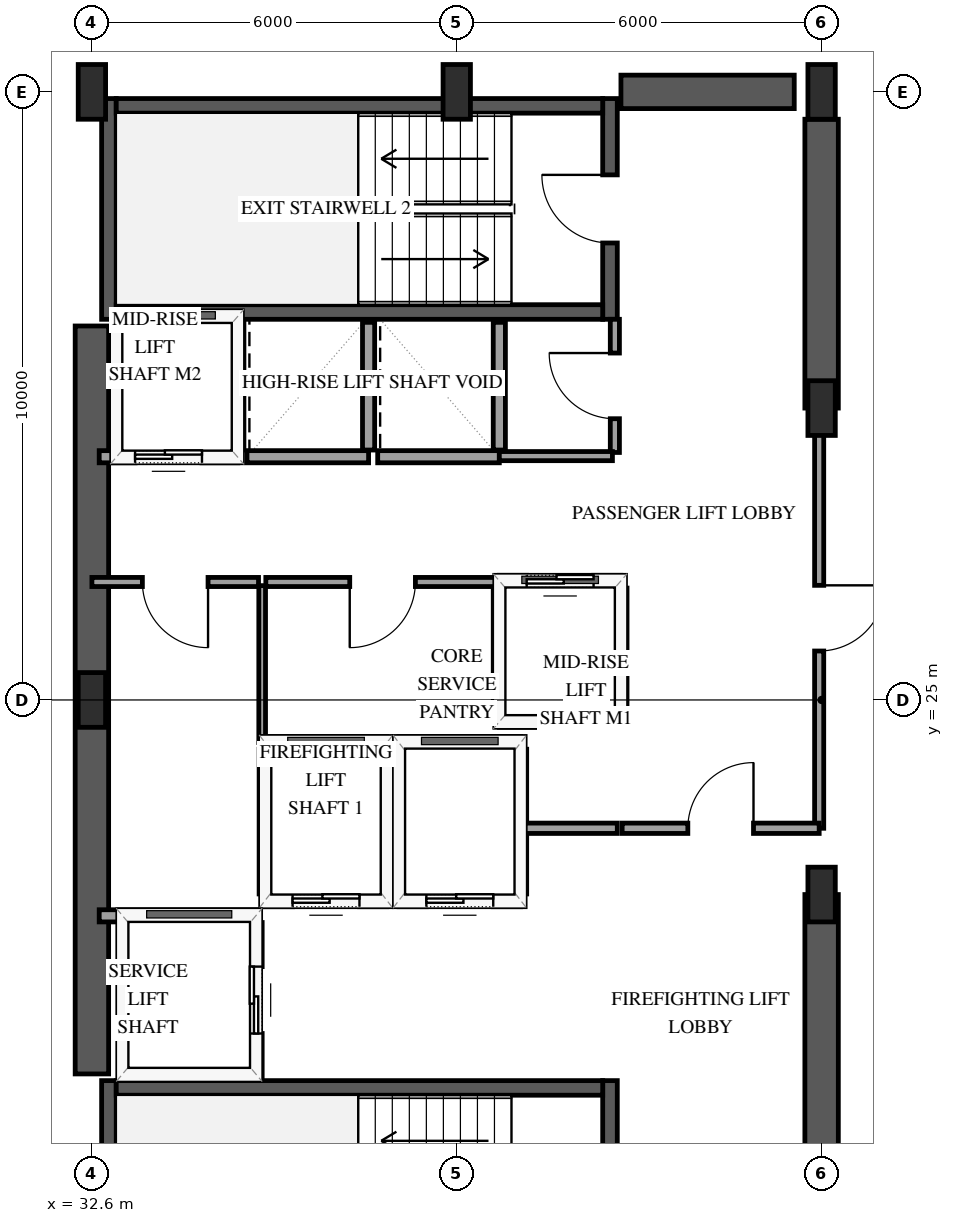
"""IFC4 building model, lengths in metres.
Left out: names, types, materials, properties, quantities, classifications, styles, units other than length and angle.
Written with IfcOpenShell. Run it as: python <this file> out.ifc"""

import sys

from ifc_helpers import new_model, si_unit, direction, frame, frame_2d, origin, origin_2d, place, context, subcontext, project, spatial, rectangle, extrude, element, fill, save


model = new_model("IFC4")
c1 = context("Model", 3, precision=1e-05, world=origin(), true_north=direction((0.0, 1.0)))
c2 = subcontext(c1, "Body", "Model", "MODEL_VIEW")
j1 = project(units=[si_unit("LENGTHUNIT", "METRE"), si_unit("PLANEANGLEUNIT", "RADIAN")], contexts=[c1])
p1 = place(None, origin())
s1 = spatial("IfcSite", under=j1, at=p1, CompositionType="ELEMENT")
p2 = place(p1, origin())
s2 = spatial("IfcBuilding", under=s1, at=p2, CompositionType="ELEMENT")
p3 = place(p2, frame((0.0, 0.0, 182.2)))
s3 = spatial("IfcBuildingStorey", under=s2, at=p3, CompositionType="ELEMENT", Elevation=182.2)
p4 = place(p3, frame((32.88, 15.11, 0.0), z_axis=(0.0, 0.0, 1.0), x_axis=(0.0, 1.0, 0.0)))
e1 = element("IfcWall", 1, at=p4, inside=s3, PredefinedType="SHEAR", context=c2, shape_type="SweptSolid", body=[
    extrude(rectangle(XDim=3.63, YDim=0.24, at=frame_2d((1.815, 0.0))), origin(), (0.0, 0.0, 1.0), 3.6),
])
p5 = place(p3, frame((41.12, 15.11, 0.0), z_axis=(0.0, 0.0, 1.0), x_axis=(0.0, 1.0, 0.0)))
e2 = element("IfcWall", 2, at=p5, inside=s3, PredefinedType="SHEAR", context=c2, shape_type="SweptSolid", body=[
    extrude(rectangle(XDim=3.63, YDim=0.24, at=frame_2d((1.815, 0.0))), origin(), (0.0, 0.0, 1.0), 3.6),
])
p6 = place(p5, frame((1.255, 0.0, 0.0)))
e3 = element("IfcOpeningElement", 3, at=p6, cuts=e2, PredefinedType="OPENING", context=c2, shape_type="SweptSolid", body=[
    extrude(rectangle(XDim=1.12, YDim=2.15, at=frame_2d((0.56, 1.075))), frame((0.0, 0.13, 0.0), z_axis=(0.0, -1.0, 0.0), x_axis=(1.0, 0.0, 0.0)), (0.0, 0.0, 1.0), 0.26),
])
p7 = place(p3, frame((33.0, 18.62, 0.0), z_axis=(0.0, 0.0, 1.0), x_axis=(1.0, 0.0, 0.0)))
e4 = element("IfcWall", 4, at=p7, inside=s3, PredefinedType="SHEAR", context=c2, shape_type="SweptSolid", body=[
    extrude(rectangle(XDim=8.0, YDim=0.24, at=frame_2d((4.0, 0.0))), origin(), (0.0, 0.0, 1.0), 3.6),
])
p8 = place(p3, frame((32.88, 31.26, 0.0), z_axis=(0.0, 0.0, 1.0), x_axis=(0.0, 1.0, 0.0)))
e5 = element("IfcWall", 5, at=p8, inside=s3, PredefinedType="SHEAR", context=c2, shape_type="SweptSolid", body=[
    extrude(rectangle(XDim=3.63, YDim=0.24, at=frame_2d((1.815, 0.0))), origin(), (0.0, 0.0, 1.0), 3.6),
])
p9 = place(p3, frame((41.12, 31.26, 0.0), z_axis=(0.0, 0.0, 1.0), x_axis=(0.0, 1.0, 0.0)))
e6 = element("IfcWall", 6, at=p9, inside=s3, PredefinedType="SHEAR", context=c2, shape_type="SweptSolid", body=[
    extrude(rectangle(XDim=3.63, YDim=0.24, at=frame_2d((1.815, 0.0))), origin(), (0.0, 0.0, 1.0), 3.6),
])
p10 = place(p9, frame((1.255, 0.0, 0.0)))
e7 = element("IfcOpeningElement", 7, at=p10, cuts=e6, PredefinedType="OPENING", context=c2, shape_type="SweptSolid", body=[
    extrude(rectangle(XDim=1.12, YDim=2.15, at=frame_2d((0.56, 1.075))), frame((0.0, 0.13, 0.0), z_axis=(0.0, -1.0, 0.0), x_axis=(1.0, 0.0, 0.0)), (0.0, 0.0, 1.0), 0.26),
])
for number, where, z_axis, x_axis in (
    (8, (33.0, 31.38, 0.0), (0.0, 0.0, 1.0), (1.0, 0.0, 0.0)),
    (9, (33.0, 34.77, 0.0), (0.0, 0.0, 1.0), (1.0, 0.0, 0.0)),
):
    element("IfcWall", number, at=place(p3, frame(where, z_axis=z_axis, x_axis=x_axis)), inside=s3, PredefinedType="SHEAR", context=c2, shape_type="SweptSolid", body=[
        extrude(rectangle(XDim=8.0, YDim=0.24, at=frame_2d((4.0, 0.0))), origin(), (0.0, 0.0, 1.0), 3.6),
    ])
p11 = place(p3, frame((32.6, 18.85, 0.0), z_axis=(0.0, 0.0, 1.0), x_axis=(0.0, 1.0, 0.0)))
e10 = element("IfcWall", 10, at=p11, inside=s3, PredefinedType="SHEAR", context=c2, shape_type="SweptSolid", body=[
    extrude(rectangle(XDim=12.3, YDim=0.55, at=frame_2d((6.15, 0.0))), origin(), (0.0, 0.0, 1.0), 3.6),
])
p12 = place(p3, frame((41.3, 35.0, 0.0), z_axis=(0.0, 0.0, 1.0), x_axis=(1.0, 0.0, 0.0)))
e11 = element("IfcWall", 11, at=p12, inside=s3, PredefinedType="SHEAR", context=c2, shape_type="SweptSolid", body=[
    extrude(rectangle(XDim=2.85, YDim=0.55, at=frame_2d((1.425, 0.0))), origin(), (0.0, 0.0, 1.0), 3.6),
])
p13 = place(p3, frame((44.6, 15.45, 0.0), z_axis=(0.0, 0.0, 1.0), x_axis=(0.0, 1.0, 0.0)))
e12 = element("IfcWall", 12, at=p13, inside=s3, PredefinedType="SHEAR", context=c2, shape_type="SweptSolid", body=[
    extrude(rectangle(XDim=6.35, YDim=0.55, at=frame_2d((3.175, 0.0))), origin(), (0.0, 0.0, 1.0), 3.6),
])
p14 = place(p3, frame((44.6, 29.8, 0.0), z_axis=(0.0, 0.0, 1.0), x_axis=(0.0, 1.0, 0.0)))
e13 = element("IfcWall", 13, at=p14, inside=s3, PredefinedType="SHEAR", context=c2, shape_type="SweptSolid", body=[
    extrude(rectangle(XDim=4.75, YDim=0.55, at=frame_2d((2.375, 0.0))), origin(), (0.0, 0.0, 1.0), 3.6),
])
for number, where, z_axis, x_axis in (
    (14, (32.6, 25.0, 0.0), (0.0, 0.0, 1.0), (1.0, 0.0, 0.0)),
    (15, (32.6, 35.0, 0.0), (0.0, 0.0, 1.0), (1.0, 0.0, 0.0)),
    (16, (38.6, 35.0, 0.0), (0.0, 0.0, 1.0), (1.0, 0.0, 0.0)),
    (17, (44.6, 21.8, 0.0), (0.0, 0.0, 1.0), (1.0, 0.0, 0.0)),
    (18, (44.6, 29.8, 0.0), (0.0, 0.0, 1.0), (1.0, 0.0, 0.0)),
    (19, (44.6, 35.0, 0.0), (0.0, 0.0, 1.0), (1.0, 0.0, 0.0)),
):
    element("IfcColumn", number, at=place(p3, frame(where, z_axis=z_axis, x_axis=x_axis)), inside=s3, PredefinedType="PILASTER", context=c2, shape_type="SweptSolid", body=[
        extrude(rectangle(XDim=0.45, YDim=0.9, at=origin_2d()), origin(), (0.0, 0.0, 1.0), 3.6),
    ])
p15 = place(p3, frame((35.45, 21.7, 0.0), z_axis=(0.0, 0.0, 1.0), x_axis=(1.0, 0.0, 0.0)))
e20 = element("IfcWall", 20, at=p15, inside=s3, PredefinedType="SOLIDWALL", context=c2, shape_type="SweptSolid", body=[
    extrude(rectangle(XDim=2.0, YDim=0.2, at=frame_2d((1.0, 0.0))), origin(), (0.0, 0.0, 1.0), 3.26),
])
p16 = place(p15, frame((0.45, 0.0, 0.0)))
e21 = element("IfcOpeningElement", 21, at=p16, cuts=e20, PredefinedType="OPENING", context=c2, shape_type="SweptSolid", body=[
    extrude(rectangle(XDim=1.1, YDim=2.15, at=frame_2d((0.55, 1.075))), frame((0.0, 0.11, 0.0), z_axis=(0.0, -1.0, 0.0), x_axis=(1.0, 0.0, 0.0)), (0.0, 0.0, 1.0), 0.22),
])
p17 = place(p3, frame((35.45, 24.3, 0.0), z_axis=(0.0, 0.0, 1.0), x_axis=(1.0, 0.0, 0.0)))
e22 = element("IfcWall", 22, at=p17, inside=s3, PredefinedType="SOLIDWALL", context=c2, shape_type="SweptSolid", body=[
    extrude(rectangle(XDim=2.0, YDim=0.2, at=frame_2d((1.0, 0.0))), origin(), (0.0, 0.0, 1.0), 3.26),
])
for number, where, z_axis, x_axis in (
    (23, (35.45, 21.81, 0.0), (0.0, 0.0, 1.0), (0.0, 1.0, 0.0)),
    (24, (37.45, 21.81, 0.0), (0.0, 0.0, 1.0), (0.0, 1.0, 0.0)),
):
    element("IfcWall", number, at=place(p3, frame(where, z_axis=z_axis, x_axis=x_axis)), inside=s3, PredefinedType="SOLIDWALL", context=c2, shape_type="SweptSolid", body=[
        extrude(rectangle(XDim=2.38, YDim=0.2, at=frame_2d((1.19, 0.0))), origin(), (0.0, 0.0, 1.0), 3.26),
    ])
p18 = place(p3, frame((37.65, 21.7, 0.0), z_axis=(0.0, 0.0, 1.0), x_axis=(1.0, 0.0, 0.0)))
e25 = element("IfcWall", 25, at=p18, inside=s3, PredefinedType="SOLIDWALL", context=c2, shape_type="SweptSolid", body=[
    extrude(rectangle(XDim=2.0, YDim=0.2, at=frame_2d((1.0, 0.0))), origin(), (0.0, 0.0, 1.0), 3.26),
])
p19 = place(p18, frame((0.45, 0.0, 0.0)))
e26 = element("IfcOpeningElement", 26, at=p19, cuts=e25, PredefinedType="OPENING", context=c2, shape_type="SweptSolid", body=[
    extrude(rectangle(XDim=1.1, YDim=2.15, at=frame_2d((0.55, 1.075))), frame((0.0, 0.11, 0.0), z_axis=(0.0, -1.0, 0.0), x_axis=(1.0, 0.0, 0.0)), (0.0, 0.0, 1.0), 0.22),
])
p20 = place(p3, frame((37.65, 24.3, 0.0), z_axis=(0.0, 0.0, 1.0), x_axis=(1.0, 0.0, 0.0)))
e27 = element("IfcWall", 27, at=p20, inside=s3, PredefinedType="SOLIDWALL", context=c2, shape_type="SweptSolid", body=[
    extrude(rectangle(XDim=2.0, YDim=0.2, at=frame_2d((1.0, 0.0))), origin(), (0.0, 0.0, 1.0), 3.26),
])
p21 = place(p3, frame((39.65, 21.81, 0.0), z_axis=(0.0, 0.0, 1.0), x_axis=(0.0, 1.0, 0.0)))
e28 = element("IfcWall", 28, at=p21, inside=s3, PredefinedType="SOLIDWALL", context=c2, shape_type="SweptSolid", body=[
    extrude(rectangle(XDim=2.38, YDim=0.2, at=frame_2d((1.19, 0.0))), origin(), (0.0, 0.0, 1.0), 3.26),
])
p22 = place(p3, frame((32.72, 21.45, 0.0), z_axis=(0.0, 0.0, 1.0), x_axis=(1.0, 0.0, 0.0)))
e29 = element("IfcWall", 29, at=p22, inside=s3, PredefinedType="SOLIDWALL", context=c2, shape_type="SweptSolid", body=[
    extrude(rectangle(XDim=2.58, YDim=0.2, at=frame_2d((1.29, 0.0))), origin(), (0.0, 0.0, 1.0), 3.26),
])
p23 = place(p3, frame((35.3, 18.79, 0.0), z_axis=(0.0, 0.0, 1.0), x_axis=(0.0, 1.0, 0.0)))
e30 = element("IfcWall", 30, at=p23, inside=s3, PredefinedType="SOLIDWALL", context=c2, shape_type="SweptSolid", body=[
    extrude(rectangle(XDim=2.55, YDim=0.2, at=frame_2d((1.275, 0.0))), origin(), (0.0, 0.0, 1.0), 3.26),
])
p24 = place(p23, frame((0.725, 0.0, 0.0)))
e31 = element("IfcOpeningElement", 31, at=p24, cuts=e30, PredefinedType="OPENING", context=c2, shape_type="SweptSolid", body=[
    extrude(rectangle(XDim=1.1, YDim=2.15, at=frame_2d((0.55, 1.075))), frame((0.0, 0.11, 0.0), z_axis=(0.0, -1.0, 0.0), x_axis=(1.0, 0.0, 0.0)), (0.0, 0.0, 1.0), 0.22),
])
p25 = place(p3, frame((39.3, 24.65, 0.0), z_axis=(0.0, 0.0, 1.0), x_axis=(1.0, 0.0, 0.0)))
e32 = element("IfcWall", 32, at=p25, inside=s3, PredefinedType="SOLIDWALL", context=c2, shape_type="SweptSolid", body=[
    extrude(rectangle(XDim=2.0, YDim=0.2, at=frame_2d((1.0, 0.0))), origin(), (0.0, 0.0, 1.0), 3.26),
])
p26 = place(p3, frame((39.3, 26.95, 0.0), z_axis=(0.0, 0.0, 1.0), x_axis=(1.0, 0.0, 0.0)))
e33 = element("IfcWall", 33, at=p26, inside=s3, PredefinedType="SOLIDWALL", context=c2, shape_type="SweptSolid", body=[
    extrude(rectangle(XDim=2.0, YDim=0.2, at=frame_2d((1.0, 0.0))), origin(), (0.0, 0.0, 1.0), 3.26),
])
p27 = place(p26, frame((0.45, 0.0, 0.0)))
e34 = element("IfcOpeningElement", 34, at=p27, cuts=e33, PredefinedType="OPENING", context=c2, shape_type="SweptSolid", body=[
    extrude(rectangle(XDim=1.1, YDim=2.15, at=frame_2d((0.55, 1.075))), frame((0.0, 0.11, 0.0), z_axis=(0.0, -1.0, 0.0), x_axis=(1.0, 0.0, 0.0)), (0.0, 0.0, 1.0), 0.22),
])
for number, where, z_axis, x_axis in (
    (35, (39.3, 24.76, 0.0), (0.0, 0.0, 1.0), (0.0, 1.0, 0.0)),
    (36, (41.3, 24.76, 0.0), (0.0, 0.0, 1.0), (0.0, 1.0, 0.0)),
):
    element("IfcWall", number, at=place(p3, frame(where, z_axis=z_axis, x_axis=x_axis)), inside=s3, PredefinedType="SOLIDWALL", context=c2, shape_type="SweptSolid", body=[
        extrude(rectangle(XDim=2.08, YDim=0.2, at=frame_2d((1.04, 0.0))), origin(), (0.0, 0.0, 1.0), 3.26),
    ])
p28 = place(p3, frame((32.72, 29.0, 0.0), z_axis=(0.0, 0.0, 1.0), x_axis=(1.0, 0.0, 0.0)))
e37 = element("IfcWall", 37, at=p28, inside=s3, PredefinedType="SOLIDWALL", context=c2, shape_type="SweptSolid", body=[
    extrude(rectangle(XDim=2.28, YDim=0.2, at=frame_2d((1.14, 0.0))), origin(), (0.0, 0.0, 1.0), 3.26),
])
p29 = place(p28, frame((0.59, 0.0, 0.0)))
e38 = element("IfcOpeningElement", 38, at=p29, cuts=e37, PredefinedType="OPENING", context=c2, shape_type="SweptSolid", body=[
    extrude(rectangle(XDim=1.1, YDim=2.15, at=frame_2d((0.55, 1.075))), frame((0.0, 0.11, 0.0), z_axis=(0.0, -1.0, 0.0), x_axis=(1.0, 0.0, 0.0)), (0.0, 0.0, 1.0), 0.22),
])
p30 = place(p3, frame((35.0, 29.11, 0.0), z_axis=(0.0, 0.0, 1.0), x_axis=(0.0, 1.0, 0.0)))
e39 = element("IfcWall", 39, at=p30, inside=s3, PredefinedType="SOLIDWALL", context=c2, shape_type="SweptSolid", body=[
    extrude(rectangle(XDim=2.1, YDim=0.2, at=frame_2d((1.05, 0.0))), origin(), (0.0, 0.0, 1.0), 3.26),
])
p31 = place(p3, frame((35.15, 29.0, 0.0), z_axis=(0.0, 0.0, 1.0), x_axis=(1.0, 0.0, 0.0)))
e40 = element("IfcWall", 40, at=p31, inside=s3, PredefinedType="SOLIDWALL", context=c2, shape_type="SweptSolid", body=[
    extrude(rectangle(XDim=2.0, YDim=0.2, at=frame_2d((1.0, 0.0))), origin(), (0.0, 0.0, 1.0), 3.26),
])
p32 = place(p3, frame((37.15, 29.11, 0.0), z_axis=(0.0, 0.0, 1.0), x_axis=(0.0, 1.0, 0.0)))
e41 = element("IfcWall", 41, at=p32, inside=s3, PredefinedType="SOLIDWALL", context=c2, shape_type="SweptSolid", body=[
    extrude(rectangle(XDim=2.1, YDim=0.2, at=frame_2d((1.05, 0.0))), origin(), (0.0, 0.0, 1.0), 3.26),
])
p33 = place(p3, frame((37.3, 29.0, 0.0), z_axis=(0.0, 0.0, 1.0), x_axis=(1.0, 0.0, 0.0)))
e42 = element("IfcWall", 42, at=p33, inside=s3, PredefinedType="SOLIDWALL", context=c2, shape_type="SweptSolid", body=[
    extrude(rectangle(XDim=2.0, YDim=0.2, at=frame_2d((1.0, 0.0))), origin(), (0.0, 0.0, 1.0), 3.26),
])
p34 = place(p3, frame((39.3, 29.11, 0.0), z_axis=(0.0, 0.0, 1.0), x_axis=(0.0, 1.0, 0.0)))
e43 = element("IfcWall", 43, at=p34, inside=s3, PredefinedType="SOLIDWALL", context=c2, shape_type="SweptSolid", body=[
    extrude(rectangle(XDim=2.1, YDim=0.2, at=frame_2d((1.05, 0.0))), origin(), (0.0, 0.0, 1.0), 3.26),
])
p35 = place(p3, frame((44.56, 29.8, 0.0), z_axis=(0.0, 0.0, 1.0), x_axis=(0.0, -1.0, 0.0)))
e44 = element("IfcWall", 44, at=p35, inside=s3, PredefinedType="PARTITIONING", context=c2, shape_type="SweptSolid", body=[
    extrude(rectangle(XDim=6.91, YDim=0.15, at=frame_2d((3.455, 0.0))), origin(), (0.0, 0.0, 1.0), 2.3),
])
p36 = place(p35, frame((2.915, 0.0, 0.0)))
e45 = element("IfcOpeningElement", 45, at=p36, cuts=e44, PredefinedType="OPENING", context=c2, shape_type="SweptSolid", body=[
    extrude(rectangle(XDim=1.08, YDim=2.15, at=frame_2d((0.54, 1.075))), frame((0.0, 0.085, 0.0), z_axis=(0.0, -1.0, 0.0), x_axis=(1.0, 0.0, 0.0)), (0.0, 0.0, 1.0), 0.17),
])
p37 = place(p3, frame((39.3, 26.94, 0.0), z_axis=(0.0, 0.0, 1.0), x_axis=(-1.0, 0.0, 0.0)))
e46 = element("IfcWall", 46, at=p37, inside=s3, PredefinedType="PARTITIONING", context=c2, shape_type="SweptSolid", body=[
    extrude(rectangle(XDim=3.84, YDim=0.15, at=frame_2d((1.92, 0.0))), origin(), (0.0, 0.0, 1.0), 3.26),
])
p38 = place(p37, frame((1.38, 0.0, 0.0)))
e47 = element("IfcOpeningElement", 47, at=p38, cuts=e46, PredefinedType="OPENING", context=c2, shape_type="SweptSolid", body=[
    extrude(rectangle(XDim=1.08, YDim=2.15, at=frame_2d((0.54, 1.075))), frame((0.0, 0.085, 0.0), z_axis=(0.0, -1.0, 0.0), x_axis=(1.0, 0.0, 0.0)), (0.0, 0.0, 1.0), 0.17),
])
p39 = place(p3, frame((41.32, 22.89, 0.0), z_axis=(0.0, 0.0, 1.0), x_axis=(1.0, 0.0, 0.0)))
e48 = element("IfcWall", 48, at=p39, inside=s3, PredefinedType="PARTITIONING", context=c2, shape_type="SweptSolid", body=[
    extrude(rectangle(XDim=3.24, YDim=0.17, at=frame_2d((1.62, 0.0))), origin(), (0.0, 0.0, 1.0), 3.26),
])
p40 = place(p39, frame((1.08, 0.0, 0.0)))
e49 = element("IfcOpeningElement", 49, at=p40, cuts=e48, PredefinedType="OPENING", context=c2, shape_type="SweptSolid", body=[
    extrude(rectangle(XDim=1.08, YDim=2.15, at=frame_2d((0.54, 1.075))), frame((0.0, 0.095, 0.0), z_axis=(0.0, -1.0, 0.0), x_axis=(1.0, 0.0, 0.0)), (0.0, 0.0, 1.0), 0.19),
])
p41 = place(p3, frame((35.34, 26.94, 0.0), z_axis=(0.0, 0.0, 1.0), x_axis=(-1.0, 0.0, 0.0)))
e50 = element("IfcWall", 50, at=p41, inside=s3, PredefinedType="PARTITIONING", context=c2, shape_type="SweptSolid", body=[
    extrude(rectangle(XDim=2.74, YDim=0.15, at=frame_2d((1.37, 0.0))), origin(), (0.0, 0.0, 1.0), 3.26),
])
p42 = place(p41, frame((0.83, 0.0, 0.0)))
e51 = element("IfcOpeningElement", 51, at=p42, cuts=e50, PredefinedType="OPENING", context=c2, shape_type="SweptSolid", body=[
    extrude(rectangle(XDim=1.08, YDim=2.15, at=frame_2d((0.54, 1.075))), frame((0.0, 0.085, 0.0), z_axis=(0.0, -1.0, 0.0), x_axis=(1.0, 0.0, 0.0)), (0.0, 0.0, 1.0), 0.17),
])
p43 = place(p3, frame((35.4, 26.88, 0.0), z_axis=(0.0, 0.0, 1.0), x_axis=(0.0, -1.0, 0.0)))
e52 = element("IfcWall", 52, at=p43, inside=s3, PredefinedType="PARTITIONING", context=c2, shape_type="SweptSolid", body=[
    extrude(rectangle(XDim=2.58, YDim=0.11, at=frame_2d((1.29, 0.0))), origin(), (0.0, 0.0, 1.0), 3.26),
])
p44 = place(p3, frame((41.2, 29.07, 0.0), z_axis=(0.0, 0.0, 1.0), x_axis=(0.0, 1.0, 0.0)))
e53 = element("IfcWall", 53, at=p44, inside=s3, PredefinedType="PARTITIONING", context=c2, shape_type="SweptSolid", body=[
    extrude(rectangle(XDim=2.19, YDim=0.15, at=frame_2d((1.095, 0.0))), origin(), (0.0, 0.0, 1.0), 3.26),
])
p45 = place(p44, frame((0.555, 0.0, 0.0)))
e54 = element("IfcOpeningElement", 54, at=p45, cuts=e53, PredefinedType="OPENING", context=c2, shape_type="SweptSolid", body=[
    extrude(rectangle(XDim=1.08, YDim=2.15, at=frame_2d((0.54, 1.075))), frame((0.0, 0.085, 0.0), z_axis=(0.0, -1.0, 0.0), x_axis=(1.0, 0.0, 0.0)), (0.0, 0.0, 1.0), 0.17),
])
p46 = place(p3, frame((39.3, 29.01, 0.0), z_axis=(0.0, 0.0, 1.0), x_axis=(1.0, 0.0, 0.0)))
e55 = element("IfcWall", 55, at=p46, inside=s3, PredefinedType="PARTITIONING", context=c2, shape_type="SweptSolid", body=[
    extrude(rectangle(XDim=1.86, YDim=0.15, at=frame_2d((0.93, 0.0))), origin(), (0.0, 0.0, 1.0), 3.26),
])
p47 = place(p3, frame((39.72, 22.89, 0.0), z_axis=(0.0, 0.0, 1.0), x_axis=(1.0, 0.0, 0.0)))
e56 = element("IfcWall", 56, at=p47, inside=s3, PredefinedType="PARTITIONING", context=c2, shape_type="SweptSolid", body=[
    extrude(rectangle(XDim=1.52, YDim=0.17, at=frame_2d((0.76, 0.0))), origin(), (0.0, 0.0, 1.0), 3.26),
])
p48 = place(p16, origin())
e57 = element("IfcDoor", 57, at=p48, inside=s3, OperationType="SLIDING_TO_LEFT", PredefinedType="DOOR", context=c2, shape_type="SweptSolid", body=[
    extrude(rectangle(XDim=1.1, YDim=2.15, at=frame_2d((0.55, 1.075))), frame((0.0, 0.025, 0.0), z_axis=(0.0, -1.0, 0.0), x_axis=(1.0, 0.0, 0.0)), (0.0, 0.0, 1.0), 0.05),
])
fill(e21, e57)
p49 = place(p19, origin())
e58 = element("IfcDoor", 58, at=p49, inside=s3, OperationType="SLIDING_TO_LEFT", PredefinedType="DOOR", context=c2, shape_type="SweptSolid", body=[
    extrude(rectangle(XDim=1.1, YDim=2.15, at=frame_2d((0.55, 1.075))), frame((0.0, 0.025, 0.0), z_axis=(0.0, -1.0, 0.0), x_axis=(1.0, 0.0, 0.0)), (0.0, 0.0, 1.0), 0.05),
])
fill(e26, e58)
p50 = place(p24, origin())
e59 = element("IfcDoor", 59, at=p50, inside=s3, OperationType="SLIDING_TO_LEFT", PredefinedType="DOOR", context=c2, shape_type="SweptSolid", body=[
    extrude(rectangle(XDim=1.1, YDim=2.15, at=frame_2d((0.55, 1.075))), frame((0.0, 0.025, 0.0), z_axis=(0.0, -1.0, 0.0), x_axis=(1.0, 0.0, 0.0)), (0.0, 0.0, 1.0), 0.05),
])
fill(e31, e59)
p51 = place(p27, origin())
e60 = element("IfcDoor", 60, at=p51, inside=s3, OperationType="SLIDING_TO_LEFT", PredefinedType="DOOR", context=c2, shape_type="SweptSolid", body=[
    extrude(rectangle(XDim=1.1, YDim=2.15, at=frame_2d((0.55, 1.075))), frame((0.0, 0.025, 0.0), z_axis=(0.0, -1.0, 0.0), x_axis=(1.0, 0.0, 0.0)), (0.0, 0.0, 1.0), 0.05),
])
fill(e34, e60)
p52 = place(p29, origin())
e61 = element("IfcDoor", 61, at=p52, inside=s3, OperationType="SLIDING_TO_LEFT", PredefinedType="DOOR", context=c2, shape_type="SweptSolid", body=[
    extrude(rectangle(XDim=1.1, YDim=2.15, at=frame_2d((0.55, 1.075))), frame((0.0, 0.025, 0.0), z_axis=(0.0, -1.0, 0.0), x_axis=(1.0, 0.0, 0.0)), (0.0, 0.0, 1.0), 0.05),
])
fill(e38, e61)
p53 = place(p10, origin())
e62 = element("IfcDoor", 62, at=p53, inside=s3, OperationType="SINGLE_SWING_RIGHT", PredefinedType="DOOR", context=c2, shape_type="SweptSolid", body=[
    extrude(rectangle(XDim=1.12, YDim=2.15, at=frame_2d((0.56, 1.075))), frame((0.0, 0.025, 0.0), z_axis=(0.0, -1.0, 0.0), x_axis=(1.0, 0.0, 0.0)), (0.0, 0.0, 1.0), 0.05),
])
fill(e7, e62)
p54 = place(p36, origin())
e63 = element("IfcDoor", 63, at=p54, inside=s3, OperationType="SINGLE_SWING_LEFT", PredefinedType="DOOR", context=c2, shape_type="SweptSolid", body=[
    extrude(rectangle(XDim=1.08, YDim=2.15, at=frame_2d((0.54, 1.075))), frame((0.0, 0.025, 0.0), z_axis=(0.0, -1.0, 0.0), x_axis=(1.0, 0.0, 0.0)), (0.0, 0.0, 1.0), 0.05),
])
fill(e45, e63)
p55 = place(p38, origin())
e64 = element("IfcDoor", 64, at=p55, inside=s3, OperationType="SINGLE_SWING_RIGHT", PredefinedType="DOOR", context=c2, shape_type="SweptSolid", body=[
    extrude(rectangle(XDim=1.08, YDim=2.15, at=frame_2d((0.54, 1.075))), frame((0.0, 0.025, 0.0), z_axis=(0.0, -1.0, 0.0), x_axis=(1.0, 0.0, 0.0)), (0.0, 0.0, 1.0), 0.05),
])
fill(e47, e64)
p56 = place(p40, origin())
e65 = element("IfcDoor", 65, at=p56, inside=s3, OperationType="SINGLE_SWING_RIGHT", PredefinedType="DOOR", context=c2, shape_type="SweptSolid", body=[
    extrude(rectangle(XDim=1.08, YDim=2.15, at=frame_2d((0.54, 1.075))), frame((0.0, 0.025, 0.0), z_axis=(0.0, -1.0, 0.0), x_axis=(1.0, 0.0, 0.0)), (0.0, 0.0, 1.0), 0.05),
])
fill(e49, e65)
p57 = place(p42, origin())
e66 = element("IfcDoor", 66, at=p57, inside=s3, OperationType="SINGLE_SWING_LEFT", PredefinedType="DOOR", context=c2, shape_type="SweptSolid", body=[
    extrude(rectangle(XDim=1.08, YDim=2.15, at=frame_2d((0.54, 1.075))), frame((0.0, 0.025, 0.0), z_axis=(0.0, -1.0, 0.0), x_axis=(1.0, 0.0, 0.0)), (0.0, 0.0, 1.0), 0.05),
])
fill(e51, e66)
p58 = place(p45, origin())
e67 = element("IfcDoor", 67, at=p58, inside=s3, OperationType="SINGLE_SWING_RIGHT", PredefinedType="DOOR", context=c2, shape_type="SweptSolid", body=[
    extrude(rectangle(XDim=1.08, YDim=2.15, at=frame_2d((0.54, 1.075))), frame((0.0, 0.025, 0.0), z_axis=(0.0, -1.0, 0.0), x_axis=(1.0, 0.0, 0.0)), (0.0, 0.0, 1.0), 0.05),
])
fill(e54, e67)
save(model, sys.argv[1])
